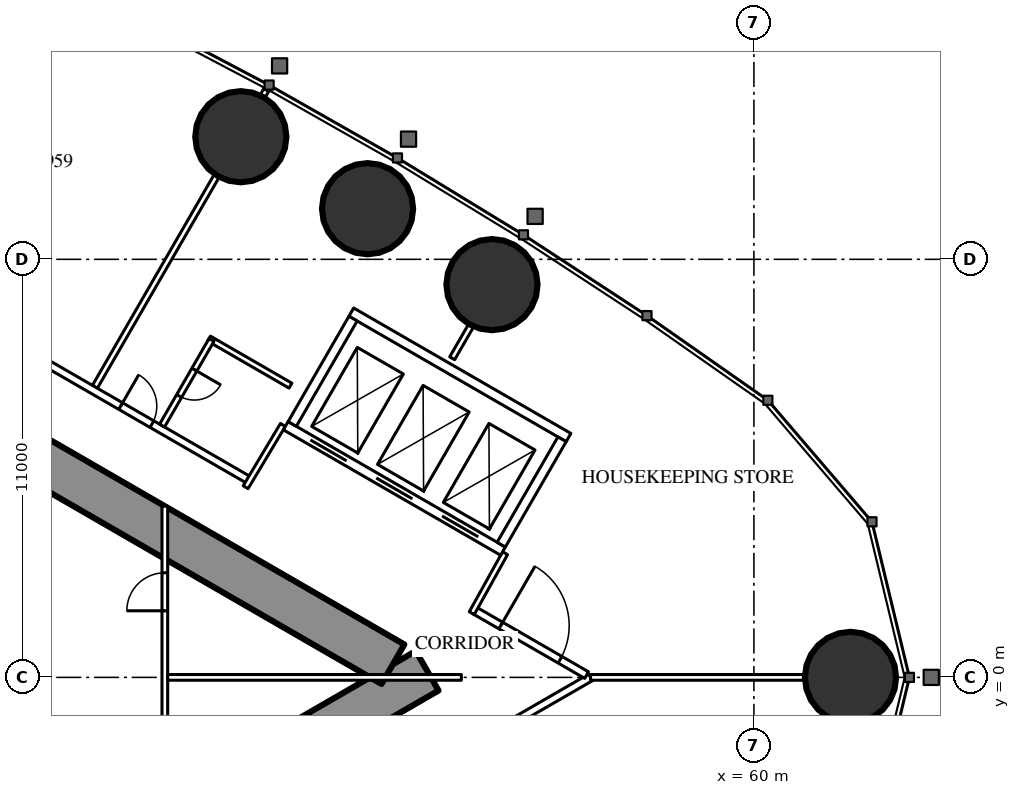
"""IFC4 building model, lengths in metres.
Left out: names, types, materials, properties, quantities, classifications, styles, units other than length and angle.
Written with IfcOpenShell. Run it as: python <this file> out.ifc"""

import sys

from ifc_helpers import new_model, si_unit, direction, frame, frame_2d, origin, origin_2d, place, context, subcontext, project, spatial, rectangle, circle, extrude, element, fill, save


model = new_model("IFC4")
c1 = context("Model", 3, precision=1e-05, world=origin(), true_north=direction((0.0, 1.0)))
c2 = subcontext(c1, "Body", "Model", "MODEL_VIEW")
j1 = project(units=[si_unit("LENGTHUNIT", "METRE"), si_unit("PLANEANGLEUNIT", "RADIAN")], contexts=[c1])
p1 = place(None, origin())
s1 = spatial("IfcSite", under=j1, at=p1, CompositionType="ELEMENT")
p2 = place(p1, origin())
s2 = spatial("IfcBuilding", under=s1, at=p2, CompositionType="ELEMENT")
p3 = place(p2, frame((0.0, 0.0, 222.5)))
s3 = spatial("IfcBuildingStorey", under=s2, at=p3, CompositionType="ELEMENT", Elevation=222.5)
for number, where, z_axis, x_axis in (
    (1, (62.542, 0.0, 0.0), (0.0, 0.0, 1.0), (1.0, 0.0, 0.0)),
    (2, (53.108, 10.334, 0.0), (0.0, 0.0, 1.0), (1.0, 0.0, 0.0)),
    (3, (49.834, 12.332, 0.0), (0.0, 0.0, 1.0), (1.0, 0.0, 0.0)),
    (4, (46.499, 14.226, 0.0), (0.0, 0.0, 1.0), (1.0, 0.0, 0.0)),
):
    element("IfcColumn", number, at=place(p3, frame(where, z_axis=z_axis, x_axis=x_axis)), inside=s3, PredefinedType="COLUMN", context=c2, shape_type="SweptSolid", body=[
        extrude(circle(Radius=1.2, at=origin_2d()), origin(), (0.0, 0.0, 1.0), 3.6),
    ])
p4 = place(p3, frame((27.2, -13.8, 0.0), z_axis=(0.0, 0.0, 1.0), x_axis=(0.866027159892, 0.499996958321, 0.0)))
e5 = element("IfcWall", 5, at=p4, inside=s3, PredefinedType="SHEAR", context=c2, shape_type="SweptSolid", body=[
    extrude(rectangle(XDim=27.947, YDim=1.2, at=frame_2d((13.973, 0.0))), origin(), (0.0, 0.0, 1.0), 3.6),
])
p5 = place(p4, frame((4.6, 0.0, 0.0)))
e6 = element("IfcOpeningElement", 6, at=p5, cuts=e5, PredefinedType="OPENING", context=c2, shape_type="SweptSolid", body=[
    extrude(rectangle(XDim=1.0, YDim=2.2, at=frame_2d((0.5, 1.1))), frame((0.0, 0.61, 0.0), z_axis=(0.0, -1.0, 0.0), x_axis=(1.0, 0.0, 0.0)), (0.0, 0.0, 1.0), 1.22),
])
p6 = place(p4, frame((13.395, 0.0, 0.0)))
e7 = element("IfcOpeningElement", 7, at=p6, cuts=e5, PredefinedType="OPENING", context=c2, shape_type="SweptSolid", body=[
    extrude(rectangle(XDim=1.8, YDim=2.2, at=frame_2d((0.9, 1.1))), frame((0.0, 0.61, 0.0), z_axis=(0.0, -1.0, 0.0), x_axis=(1.0, 0.0, 0.0)), (0.0, 0.0, 1.0), 1.22),
])
p7 = place(p3, frame((27.2, 13.8, 0.0), z_axis=(0.0, 0.0, 1.0), x_axis=(0.866024515034, -0.500001539357, 0.0)))
e8 = element("IfcWall", 8, at=p7, inside=s3, PredefinedType="SHEAR", context=c2, shape_type="SweptSolid", body=[
    extrude(rectangle(XDim=26.907, YDim=1.2, at=frame_2d((13.454, 0.0))), origin(), (0.0, 0.0, 1.0), 3.6),
])
p8 = place(p7, frame((4.6, 0.0, 0.0)))
e9 = element("IfcOpeningElement", 9, at=p8, cuts=e8, PredefinedType="OPENING", context=c2, shape_type="SweptSolid", body=[
    extrude(rectangle(XDim=1.0, YDim=2.2, at=frame_2d((0.5, 1.1))), frame((0.0, 0.61, 0.0), z_axis=(0.0, -1.0, 0.0), x_axis=(1.0, 0.0, 0.0)), (0.0, 0.0, 1.0), 1.22),
])
p9 = place(p7, frame((13.395, 0.0, 0.0)))
e10 = element("IfcOpeningElement", 10, at=p9, cuts=e8, PredefinedType="OPENING", context=c2, shape_type="SweptSolid", body=[
    extrude(rectangle(XDim=1.8, YDim=2.2, at=frame_2d((0.9, 1.1))), frame((0.0, 0.61, 0.0), z_axis=(0.0, -1.0, 0.0), x_axis=(1.0, 0.0, 0.0)), (0.0, 0.0, 1.0), 1.22),
])
p10 = place(p3, frame((28.959, -15.44, 0.0), z_axis=(0.0, 0.0, 1.0), x_axis=(0.866025227435, 0.500000305447, 0.0)))
e11 = element("IfcWall", 11, at=p10, inside=s3, PredefinedType="PARTITIONING", context=c2, shape_type="SweptSolid", body=[
    extrude(rectangle(XDim=30.88, YDim=0.2, at=frame_2d((15.44, 0.0))), origin(), (0.0, 0.0, 1.0), 3.35),
])
p11 = place(p10, frame((1.494, 0.0, 0.0)))
e12 = element("IfcOpeningElement", 12, at=p11, cuts=e11, PredefinedType="OPENING", context=c2, shape_type="SweptSolid", body=[
    extrude(rectangle(XDim=1.8, YDim=2.03, at=frame_2d((0.9, 1.015))), frame((0.0, 0.11, 0.0), z_axis=(0.0, -1.0, 0.0), x_axis=(1.0, 0.0, 0.0)), (0.0, 0.0, 1.0), 0.22),
])
p12 = place(p10, frame((7.687, 0.0, 0.0)))
e13 = element("IfcOpeningElement", 13, at=p12, cuts=e11, PredefinedType="OPENING", context=c2, shape_type="SweptSolid", body=[
    extrude(rectangle(XDim=1.0, YDim=2.2, at=frame_2d((0.5, 1.1))), frame((0.0, 0.11, 0.0), z_axis=(0.0, -1.0, 0.0), x_axis=(1.0, 0.0, 0.0)), (0.0, 0.0, 1.0), 0.22),
])
p13 = place(p10, frame((16.137, 0.0, 0.0)))
e14 = element("IfcOpeningElement", 14, at=p13, cuts=e11, PredefinedType="OPENING", context=c2, shape_type="SweptSolid", body=[
    extrude(rectangle(XDim=0.95, YDim=2.2, at=frame_2d((0.475, 1.1))), frame((0.0, 0.11, 0.0), z_axis=(0.0, -1.0, 0.0), x_axis=(1.0, 0.0, 0.0)), (0.0, 0.0, 1.0), 0.22),
])
p14 = place(p10, frame((20.021, 0.0, 0.0)))
e15 = element("IfcOpeningElement", 15, at=p14, cuts=e11, PredefinedType="OPENING", context=c2, shape_type="SweptSolid", body=[
    extrude(rectangle(XDim=0.95, YDim=2.2, at=frame_2d((0.475, 1.1))), frame((0.0, 0.11, 0.0), z_axis=(0.0, -1.0, 0.0), x_axis=(1.0, 0.0, 0.0)), (0.0, 0.0, 1.0), 0.22),
])
p15 = place(p10, frame((26.253, 0.0, 0.0)))
e16 = element("IfcOpeningElement", 16, at=p15, cuts=e11, PredefinedType="OPENING", context=c2, shape_type="SweptSolid", body=[
    extrude(rectangle(XDim=0.95, YDim=2.2, at=frame_2d((0.475, 1.1))), frame((0.0, 0.11, 0.0), z_axis=(0.0, -1.0, 0.0), x_axis=(1.0, 0.0, 0.0)), (0.0, 0.0, 1.0), 0.22),
])
p16 = place(p3, frame((42.66, 7.646, 0.0), z_axis=(0.0, 0.0, 1.0), x_axis=(0.499996592859, 0.866027370889, 0.0)))
e17 = element("IfcWall", 17, at=p16, inside=s3, PredefinedType="PARTITIONING", context=c2, shape_type="SweptSolid", body=[
    extrude(rectangle(XDim=6.398, YDim=0.15, at=frame_2d((3.199, 0.0))), origin(), (0.0, 0.0, 1.0), 2.45),
])
p17 = place(p3, frame((47.079, 15.3, 0.0), z_axis=(0.0, 0.0, 1.0), x_axis=(0.499212083968, 0.866479829667, 0.0)))
e18 = element("IfcWall", 18, at=p17, inside=s3, PredefinedType="PARTITIONING", context=c2, shape_type="SweptSolid", body=[
    extrude(rectangle(XDim=0.179, YDim=0.15, at=frame_2d((0.09, 0.0))), origin(), (0.0, 0.0, 1.0), 2.45),
])
p18 = place(p3, frame((55.702, 0.0, 0.0), z_axis=(0.0, 0.0, 1.0), x_axis=(1.0, 0.0, 0.0)))
e19 = element("IfcWall", 19, at=p18, inside=s3, PredefinedType="PARTITIONING", context=c2, shape_type="SweptSolid", body=[
    extrude(rectangle(XDim=5.619, YDim=0.15, at=frame_2d((2.81, 0.0))), origin(), (0.0, 0.0, 1.0), 2.45),
])
p19 = place(p3, frame((52.06, 8.396, 0.0), z_axis=(0.0, 0.0, 1.0), x_axis=(0.500095379624, 0.865970329329, 0.0)))
e20 = element("IfcWall", 20, at=p19, inside=s3, PredefinedType="PARTITIONING", context=c2, shape_type="SweptSolid", body=[
    extrude(rectangle(XDim=0.982, YDim=0.15, at=frame_2d((0.491, 0.0))), origin(), (0.0, 0.0, 1.0), 3.35),
])
p20 = place(p3, frame((28.959, 15.44, 0.0), z_axis=(0.0, 0.0, 1.0), x_axis=(0.866028936079, -0.499993881836, 0.0)))
e21 = element("IfcWall", 21, at=p20, inside=s3, PredefinedType="PARTITIONING", context=c2, shape_type="SweptSolid", body=[
    extrude(rectangle(XDim=20.503, YDim=0.2, at=frame_2d((10.251, 0.0))), origin(), (0.0, 0.0, 1.0), 3.35),
])
p21 = place(p20, frame((16.603, 0.0, 0.0)))
e22 = element("IfcOpeningElement", 22, at=p21, cuts=e21, PredefinedType="OPENING", context=c2, shape_type="SweptSolid", body=[
    extrude(rectangle(XDim=0.95, YDim=2.2, at=frame_2d((0.475, 1.1))), frame((0.0, 0.11, 0.0), z_axis=(0.0, -1.0, 0.0), x_axis=(1.0, 0.0, 0.0)), (0.0, 0.0, 1.0), 0.22),
])
p22 = place(p20, frame((7.287, 0.0, 0.0)))
e23 = element("IfcOpeningElement", 23, at=p22, cuts=e21, PredefinedType="OPENING", context=c2, shape_type="SweptSolid", body=[
    extrude(rectangle(XDim=0.95, YDim=2.2, at=frame_2d((0.475, 1.1))), frame((0.0, 0.11, 0.0), z_axis=(0.0, -1.0, 0.0), x_axis=(1.0, 0.0, 0.0)), (0.0, 0.0, 1.0), 0.22),
])
p23 = place(p20, frame((2.244, 0.0, 0.0)))
e24 = element("IfcOpeningElement", 24, at=p23, cuts=e21, PredefinedType="OPENING", context=c2, shape_type="SweptSolid", body=[
    extrude(rectangle(XDim=1.8, YDim=2.03, at=frame_2d((0.9, 1.015))), frame((0.0, 0.11, 0.0), z_axis=(0.0, -1.0, 0.0), x_axis=(1.0, 0.0, 0.0)), (0.0, 0.0, 1.0), 0.22),
])
p24 = place(p3, frame((52.639, 1.769, 0.0), z_axis=(0.0, 0.0, 1.0), x_axis=(0.866027340901, -0.4999966448, 0.0)))
e25 = element("IfcWall", 25, at=p24, inside=s3, PredefinedType="PARTITIONING", context=c2, shape_type="SweptSolid", body=[
    extrude(rectangle(XDim=3.417, YDim=0.2, at=frame_2d((1.708, 0.0))), origin(), (0.0, 0.0, 1.0), 3.35),
])
p25 = place(p24, frame((0.809, 0.0, 0.0)))
e26 = element("IfcOpeningElement", 26, at=p25, cuts=e25, PredefinedType="OPENING", context=c2, shape_type="SweptSolid", body=[
    extrude(rectangle(XDim=1.8, YDim=2.2, at=frame_2d((0.9, 1.1))), frame((0.0, 0.11, 0.0), z_axis=(0.0, -1.0, 0.0), x_axis=(1.0, 0.0, 0.0)), (0.0, 0.0, 1.0), 0.22),
])
p26 = place(p3, frame((47.606, 6.642, 0.0), z_axis=(0.0, 0.0, 1.0), x_axis=(-0.51353662755, -0.858067673418, 0.0)))
e27 = element("IfcWall", 27, at=p26, inside=s3, PredefinedType="PARTITIONING", context=c2, shape_type="SweptSolid", body=[
    extrude(rectangle(XDim=1.91, YDim=0.15, at=frame_2d((0.955, 0.0))), origin(), (0.0, 0.0, 1.0), 3.35),
])
p27 = place(p3, frame((52.576, 1.689, 0.0), z_axis=(0.0, 0.0, 1.0), x_axis=(0.485424724123, 0.874278466629, 0.0)))
e28 = element("IfcWall", 28, at=p27, inside=s3, PredefinedType="PARTITIONING", context=c2, shape_type="SweptSolid", body=[
    extrude(rectangle(XDim=1.805, YDim=0.15, at=frame_2d((0.903, 0.0))), origin(), (0.0, 0.0, 1.0), 3.35),
])
p28 = place(p3, frame((45.662, 8.914, 0.0), z_axis=(0.0, 0.0, 1.0), x_axis=(0.86604923931, -0.499958713387, 0.0)))
e29 = element("IfcWall", 29, at=p28, inside=s3, PredefinedType="PARTITIONING", context=c2, shape_type="SweptSolid", body=[
    extrude(rectangle(XDim=2.475, YDim=0.15, at=frame_2d((1.237, 0.0))), origin(), (0.0, 0.0, 1.0), 3.35),
])
p29 = place(p3, frame((44.427, 6.625, 0.0), z_axis=(0.0, 0.0, 1.0), x_axis=(0.500006934395, 0.866021400173, 0.0)))
e30 = element("IfcWall", 30, at=p29, inside=s3, PredefinedType="PARTITIONING", context=c2, shape_type="SweptSolid", body=[
    extrude(rectangle(XDim=2.6, YDim=0.15, at=frame_2d((1.3, 0.0))), origin(), (0.0, 0.0, 1.0), 3.35),
])
p30 = place(p29, frame((0.9, 0.0, 0.0)))
e31 = element("IfcOpeningElement", 31, at=p30, cuts=e30, PredefinedType="OPENING", context=c2, shape_type="SweptSolid", body=[
    extrude(rectangle(XDim=0.8, YDim=2.2, at=frame_2d((0.4, 1.1))), frame((0.0, 0.085, 0.0), z_axis=(0.0, -1.0, 0.0), x_axis=(1.0, 0.0, 0.0)), (0.0, 0.0, 1.0), 0.17),
])
p31 = place(p3, frame((44.5, -4.505, 0.0), z_axis=(0.0, 0.0, 1.0), x_axis=(0.0, 1.0, 0.0)))
e32 = element("IfcWall", 32, at=p31, inside=s3, PredefinedType="PARTITIONING", context=c2, shape_type="SweptSolid", body=[
    extrude(rectangle(XDim=9.009, YDim=0.15, at=frame_2d((4.505, 0.0))), origin(), (0.0, 0.0, 1.0), 3.35),
])
p32 = place(p31, frame((1.752, 0.0, 0.0)))
e33 = element("IfcOpeningElement", 33, at=p32, cuts=e32, PredefinedType="OPENING", context=c2, shape_type="SweptSolid", body=[
    extrude(rectangle(XDim=1.0, YDim=2.2, at=frame_2d((0.5, 1.1))), frame((0.0, 0.085, 0.0), z_axis=(0.0, -1.0, 0.0), x_axis=(1.0, 0.0, 0.0)), (0.0, 0.0, 1.0), 0.17),
])
p33 = place(p31, frame((6.257, 0.0, 0.0)))
e34 = element("IfcOpeningElement", 34, at=p33, cuts=e32, PredefinedType="OPENING", context=c2, shape_type="SweptSolid", body=[
    extrude(rectangle(XDim=1.0, YDim=2.2, at=frame_2d((0.5, 1.1))), frame((0.0, 0.085, 0.0), z_axis=(0.0, -1.0, 0.0), x_axis=(1.0, 0.0, 0.0)), (0.0, 0.0, 1.0), 0.17),
])
p34 = place(p3, frame((44.575, 0.0, 0.0), z_axis=(0.0, 0.0, 1.0), x_axis=(1.0, 0.0, 0.0)))
e35 = element("IfcWall", 35, at=p34, inside=s3, PredefinedType="PARTITIONING", context=c2, shape_type="SweptSolid", body=[
    extrude(rectangle(XDim=7.727, YDim=0.15, at=frame_2d((3.864, 0.0))), origin(), (0.0, 0.0, 1.0), 2.45),
])
p35 = place(p3, frame((47.681, 6.622, 0.0), z_axis=(0.0, 0.0, 1.0), x_axis=(0.86603344179, -0.499986077507, 0.0)))
e36 = element("IfcWall", 36, at=p35, inside=s3, PredefinedType="PARTITIONING", context=c2, shape_type="SweptSolid", body=[
    extrude(rectangle(XDim=6.6, YDim=0.25, at=frame_2d((3.3, 0.0))), origin(), (0.0, 0.0, 1.0), 3.35),
])
p36 = place(p35, frame((0.75, 0.0, 0.0)))
e37 = element("IfcOpeningElement", 37, at=p36, cuts=e36, PredefinedType="OPENING", context=c2, shape_type="SweptSolid", body=[
    extrude(rectangle(XDim=1.1, YDim=2.2, at=frame_2d((0.55, 1.1))), frame((0.0, 0.135, 0.0), z_axis=(0.0, -1.0, 0.0), x_axis=(1.0, 0.0, 0.0)), (0.0, 0.0, 1.0), 0.27),
])
p37 = place(p35, frame((2.75, 0.0, 0.0)))
e38 = element("IfcOpeningElement", 38, at=p37, cuts=e36, PredefinedType="OPENING", context=c2, shape_type="SweptSolid", body=[
    extrude(rectangle(XDim=1.1, YDim=2.2, at=frame_2d((0.55, 1.1))), frame((0.0, 0.135, 0.0), z_axis=(0.0, -1.0, 0.0), x_axis=(1.0, 0.0, 0.0)), (0.0, 0.0, 1.0), 0.27),
])
p38 = place(p35, frame((4.75, 0.0, 0.0)))
e39 = element("IfcOpeningElement", 39, at=p38, cuts=e36, PredefinedType="OPENING", context=c2, shape_type="SweptSolid", body=[
    extrude(rectangle(XDim=1.1, YDim=2.2, at=frame_2d((0.55, 1.1))), frame((0.0, 0.135, 0.0), z_axis=(0.0, -1.0, 0.0), x_axis=(1.0, 0.0, 0.0)), (0.0, 0.0, 1.0), 0.27),
])
p39 = place(p3, frame((49.406, 9.611, 0.0), z_axis=(0.0, 0.0, 1.0), x_axis=(0.86603344179, -0.499986077507, 0.0)))
e40 = element("IfcWall", 40, at=p39, inside=s3, PredefinedType="PARTITIONING", context=c2, shape_type="SweptSolid", body=[
    extrude(rectangle(XDim=6.6, YDim=0.25, at=frame_2d((3.3, 0.0))), origin(), (0.0, 0.0, 1.0), 3.35),
])
p40 = place(p3, frame((47.852, 6.668, 0.0), z_axis=(0.0, 0.0, 1.0), x_axis=(0.499929347863, 0.866066190972, 0.0)))
e41 = element("IfcWall", 41, at=p40, inside=s3, PredefinedType="PARTITIONING", context=c2, shape_type="SweptSolid", body=[
    extrude(rectangle(XDim=3.201, YDim=0.25, at=frame_2d((1.6, 0.0))), origin(), (0.0, 0.0, 1.0), 3.35),
])
p41 = place(p3, frame((53.352, 3.493, 0.0), z_axis=(0.0, 0.0, 1.0), x_axis=(0.499872130319, 0.866099216793, 0.0)))
e42 = element("IfcWall", 42, at=p41, inside=s3, PredefinedType="PARTITIONING", context=c2, shape_type="SweptSolid", body=[
    extrude(rectangle(XDim=3.2, YDim=0.25, at=frame_2d((1.6, 0.0))), origin(), (0.0, 0.0, 1.0), 3.35),
])
p42 = place(p30, origin())
e43 = element("IfcDoor", 43, at=p42, inside=s3, OperationType="SINGLE_SWING_RIGHT", PredefinedType="DOOR", context=c2, shape_type="SweptSolid", body=[
    extrude(rectangle(XDim=0.8, YDim=2.2, at=frame_2d((0.4, 1.1))), frame((0.0, 0.025, 0.0), z_axis=(0.0, -1.0, 0.0), x_axis=(1.0, 0.0, 0.0)), (0.0, 0.0, 1.0), 0.05),
])
fill(e31, e43)
p43 = place(p21, origin())
e44 = element("IfcDoor", 44, at=p43, inside=s3, OperationType="SINGLE_SWING_LEFT", PredefinedType="DOOR", context=c2, shape_type="SweptSolid", body=[
    extrude(rectangle(XDim=0.95, YDim=2.2, at=frame_2d((0.475, 1.1))), frame((0.0, 0.025, 0.0), z_axis=(0.0, -1.0, 0.0), x_axis=(1.0, 0.0, 0.0)), (0.0, 0.0, 1.0), 0.05),
])
fill(e22, e44)
p44 = place(p25, origin())
e45 = element("IfcDoor", 45, at=p44, inside=s3, OperationType="DOUBLE_DOOR_SINGLE_SWING", PredefinedType="DOOR", context=c2, shape_type="SweptSolid", body=[
    extrude(rectangle(XDim=1.8, YDim=2.2, at=frame_2d((0.9, 1.1))), frame((0.0, 0.025, 0.0), z_axis=(0.0, -1.0, 0.0), x_axis=(1.0, 0.0, 0.0)), (0.0, 0.0, 1.0), 0.05),
])
fill(e26, e45)
p45 = place(p33, origin())
e46 = element("IfcDoor", 46, at=p45, inside=s3, OperationType="SINGLE_SWING_LEFT", PredefinedType="DOOR", context=c2, shape_type="SweptSolid", body=[
    extrude(rectangle(XDim=1.0, YDim=2.2, at=frame_2d((0.5, 1.1))), frame((0.0, 0.025, 0.0), z_axis=(0.0, -1.0, 0.0), x_axis=(1.0, 0.0, 0.0)), (0.0, 0.0, 1.0), 0.05),
])
fill(e34, e46)
p46 = place(p36, origin())
e47 = element("IfcDoor", 47, at=p46, inside=s3, OperationType="DOUBLE_DOOR_SLIDING", PredefinedType="USERDEFINED", context=c2, shape_type="SweptSolid", body=[
    extrude(rectangle(XDim=1.1, YDim=2.2, at=frame_2d((0.55, 1.1))), frame((0.0, 0.025, 0.0), z_axis=(0.0, -1.0, 0.0), x_axis=(1.0, 0.0, 0.0)), (0.0, 0.0, 1.0), 0.05),
])
fill(e37, e47)
p47 = place(p37, origin())
e48 = element("IfcDoor", 48, at=p47, inside=s3, OperationType="DOUBLE_DOOR_SLIDING", PredefinedType="USERDEFINED", context=c2, shape_type="SweptSolid", body=[
    extrude(rectangle(XDim=1.1, YDim=2.2, at=frame_2d((0.55, 1.1))), frame((0.0, 0.025, 0.0), z_axis=(0.0, -1.0, 0.0), x_axis=(1.0, 0.0, 0.0)), (0.0, 0.0, 1.0), 0.05),
])
fill(e38, e48)
p48 = place(p38, origin())
e49 = element("IfcDoor", 49, at=p48, inside=s3, OperationType="DOUBLE_DOOR_SLIDING", PredefinedType="USERDEFINED", context=c2, shape_type="SweptSolid", body=[
    extrude(rectangle(XDim=1.1, YDim=2.2, at=frame_2d((0.55, 1.1))), frame((0.0, 0.025, 0.0), z_axis=(0.0, -1.0, 0.0), x_axis=(1.0, 0.0, 0.0)), (0.0, 0.0, 1.0), 0.05),
])
fill(e39, e49)
save(model, sys.argv[1])
